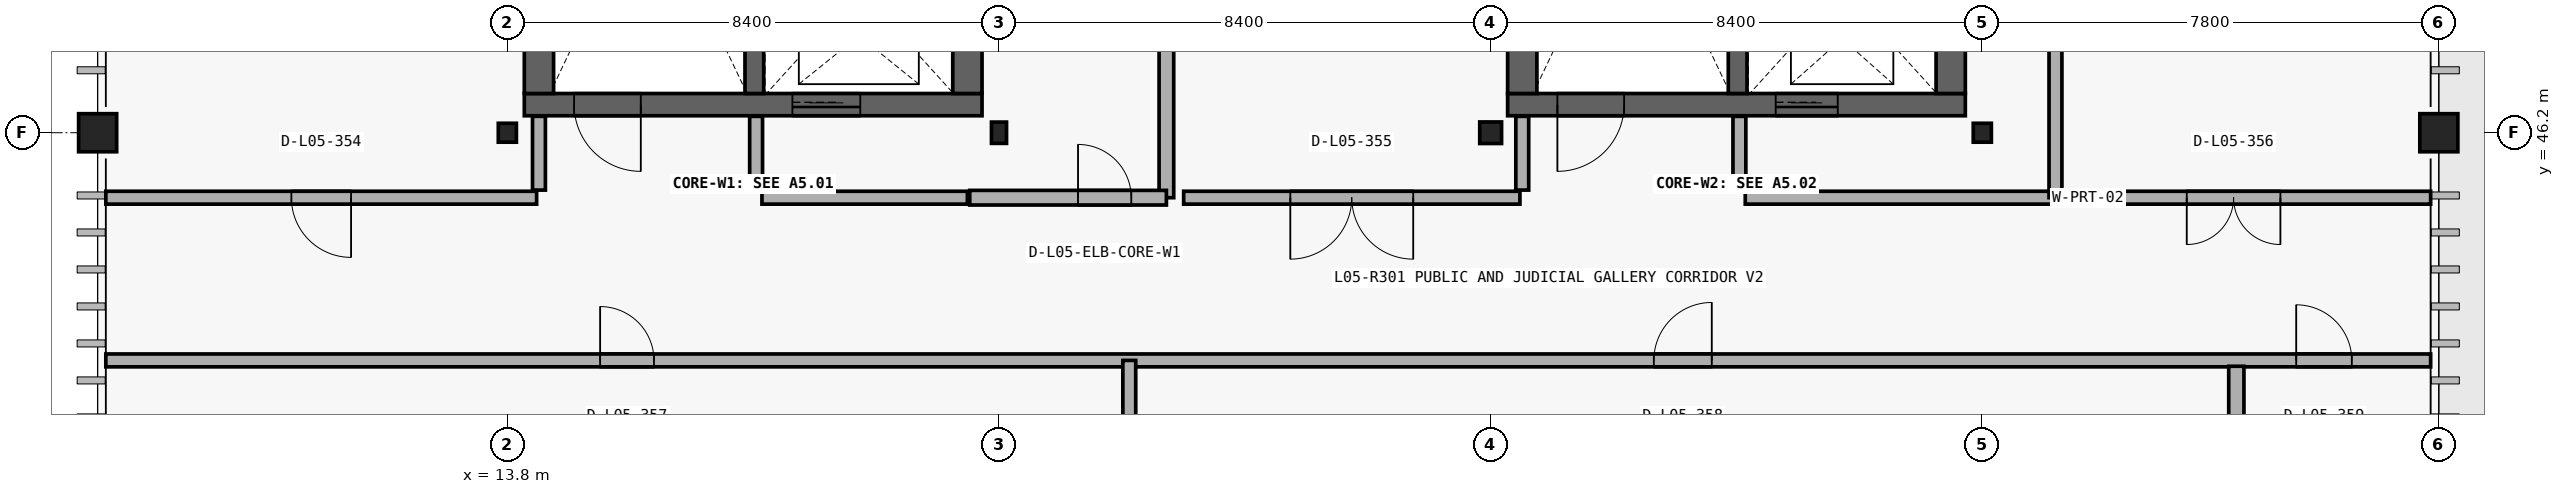
"""IFC4 building model, lengths in metres.
Left out: names, types, materials, properties, quantities, classifications, styles, units other than length and angle.
Written with IfcOpenShell. Run it as: python <this file> out.ifc"""

import sys

from ifc_helpers import new_model, si_unit, direction, frame, frame_2d, origin_with_axes, origin_2d_with_axis, place, context, subcontext, project, spatial, rectangle, circle, i_section, extrude, element, fill, save


model = new_model("IFC4")
c1 = context("Model", 3, precision=1e-05, world=origin_with_axes(), true_north=direction((0.0, 1.0)))
c2 = subcontext(c1, "Body", "Model", "MODEL_VIEW")
j1 = project(units=[si_unit("LENGTHUNIT", "METRE"), si_unit("PLANEANGLEUNIT", "RADIAN")], contexts=[c1])
p1 = place(None, origin_with_axes())
s1 = spatial("IfcSite", under=j1, at=p1, CompositionType="ELEMENT")
p2 = place(p1, origin_with_axes())
s2 = spatial("IfcBuilding", under=s1, at=p2, CompositionType="ELEMENT")
p3 = place(p2, frame((0.0, 0.0, 24.9), z_axis=(0.0, 0.0, 1.0), x_axis=(1.0, 0.0, 0.0)))
s3 = spatial("IfcBuildingStorey", under=s2, at=p3, CompositionType="ELEMENT", Elevation=24.9)
p4 = place(None, frame((14.09, 46.68, 24.9), z_axis=(0.0, 0.0, 1.0), x_axis=(1.0, 0.0, 0.0)))
e1 = element("IfcWall", 1, at=p4, inside=s3, PredefinedType="SHEAR", context=c2, shape_type="SweptSolid", body=[
    extrude(rectangle(XDim=7.82, YDim=0.38, at=frame_2d((3.91, 0.0), x_axis=(1.0, 0.0))), origin_with_axes(), (0.0, 0.0, 1.0), 4.8),
])
p5 = place(None, frame((15.51, 46.68, 24.9), z_axis=(0.0, 0.0, 1.0), x_axis=(1.0, 0.0, 0.0)))
e2 = element("IfcOpeningElement", 2, at=p5, cuts=e1, PredefinedType="OPENING", context=c2, shape_type="SweptSolid", body=[
    extrude(rectangle(XDim=1.14, YDim=2.18, at=frame_2d((0.0, 1.09), x_axis=(1.0, 0.0))), frame((0.0, 0.2, 0.0), z_axis=(0.0, -1.0, 0.0), x_axis=(1.0, 0.0, 0.0)), (0.0, 0.0, 1.0), 0.4),
])
p6 = place(None, frame((19.25, 46.68, 24.9), z_axis=(0.0, 0.0, 1.0), x_axis=(1.0, 0.0, 0.0)))
e3 = element("IfcOpeningElement", 3, at=p6, cuts=e1, PredefinedType="OPENING", context=c2, shape_type="SweptSolid", body=[
    extrude(rectangle(XDim=1.16, YDim=2.2, at=frame_2d((0.0, 1.1), x_axis=(1.0, 0.0))), frame((0.0, 0.2, 0.0), z_axis=(0.0, -1.0, 0.0), x_axis=(1.0, 0.0, 0.0)), (0.0, 0.0, 1.0), 0.4),
])
p7 = place(None, frame((21.66, 46.87, 24.9), z_axis=(0.0, 0.0, 1.0), x_axis=(0.0, 1.0, 0.0)))
e4 = element("IfcWall", 4, at=p7, inside=s3, PredefinedType="SHEAR", context=c2, shape_type="SweptSolid", body=[
    extrude(rectangle(XDim=7.06, YDim=0.5, at=frame_2d((3.53, 0.0), x_axis=(1.0, 0.0))), origin_with_axes(), (0.0, 0.0, 1.0), 4.8),
])
p8 = place(None, frame((21.66, 52.66, 24.9), z_axis=(0.0, 0.0, 1.0), x_axis=(0.0, 1.0, 0.0)))
e5 = element("IfcOpeningElement", 5, at=p8, cuts=e4, PredefinedType="OPENING", context=c2, shape_type="SweptSolid", body=[
    extrude(rectangle(XDim=1.16, YDim=2.2, at=frame_2d((0.0, 1.1), x_axis=(1.0, 0.0))), frame((0.0, 0.26, 0.0), z_axis=(0.0, -1.0, 0.0), x_axis=(1.0, 0.0, 0.0)), (0.0, 0.0, 1.0), 0.52),
])
p9 = place(None, frame((14.34, 53.93, 24.9), z_axis=(0.0, 0.0, 1.0), x_axis=(0.0, -1.0, 0.0)))
e6 = element("IfcWall", 6, at=p9, inside=s3, PredefinedType="SHEAR", context=c2, shape_type="SweptSolid", body=[
    extrude(rectangle(XDim=7.06, YDim=0.5, at=frame_2d((3.53, 0.0), x_axis=(1.0, 0.0))), origin_with_axes(), (0.0, 0.0, 1.0), 4.8),
])
p10 = place(None, frame((18.02, 46.87, 24.9), z_axis=(0.0, 0.0, 1.0), x_axis=(0.0, 1.0, 0.0)))
e7 = element("IfcWall", 7, at=p10, inside=s3, PredefinedType="SHEAR", context=c2, shape_type="SweptSolid", body=[
    extrude(rectangle(XDim=7.06, YDim=0.32, at=frame_2d((3.53, 0.0), x_axis=(1.0, 0.0))), origin_with_axes(), (0.0, 0.0, 1.0), 4.8),
])
p11 = place(None, frame((25.06, 45.09, 24.9), z_axis=(0.0, 0.0, 1.0), x_axis=(0.0, 1.0, 0.0)))
e8 = element("IfcWall", 8, at=p11, inside=s3, PredefinedType="PARTITIONING", context=c2, shape_type="SweptSolid", body=[
    extrude(rectangle(XDim=9.03, YDim=0.25, at=frame_2d((4.515, 0.0), x_axis=(1.0, 0.0))), origin_with_axes(), (0.0, 0.0, 1.0), 4.44),
])
p12 = place(None, frame((21.7, 45.09, 24.9), z_axis=(0.0, 0.0, 1.0), x_axis=(1.0, 0.0, 0.0)))
e9 = element("IfcWall", 9, at=p12, inside=s3, PredefinedType="PARTITIONING", context=c2, shape_type="SweptSolid", body=[
    extrude(rectangle(XDim=3.36, YDim=0.25, at=frame_2d((1.68, 0.0), x_axis=(1.0, 0.0))), origin_with_axes(), (0.0, 0.0, 1.0), 4.44),
])
p13 = place(None, frame((24.005, 45.09, 24.9), z_axis=(0.0, 0.0, 1.0), x_axis=(1.0, 0.0, 0.0)))
e10 = element("IfcOpeningElement", 10, at=p13, cuts=e9, PredefinedType="OPENING", context=c2, shape_type="SweptSolid", body=[
    extrude(rectangle(XDim=0.91, YDim=2.12, at=frame_2d((0.0, 1.06), x_axis=(1.0, 0.0))), frame((0.0, 0.135, 0.0), z_axis=(0.0, -1.0, 0.0), x_axis=(1.0, 0.0, 0.0)), (0.0, 0.0, 1.0), 0.27),
])
p14 = place(None, frame((30.89, 46.68, 24.9), z_axis=(0.0, 0.0, 1.0), x_axis=(1.0, 0.0, 0.0)))
e11 = element("IfcWall", 11, at=p14, inside=s3, PredefinedType="SHEAR", context=c2, shape_type="SweptSolid", body=[
    extrude(rectangle(XDim=7.82, YDim=0.38, at=frame_2d((3.91, 0.0), x_axis=(1.0, 0.0))), origin_with_axes(), (0.0, 0.0, 1.0), 4.8),
])
p15 = place(None, frame((32.31, 46.68, 24.9), z_axis=(0.0, 0.0, 1.0), x_axis=(1.0, 0.0, 0.0)))
e12 = element("IfcOpeningElement", 12, at=p15, cuts=e11, PredefinedType="OPENING", context=c2, shape_type="SweptSolid", body=[
    extrude(rectangle(XDim=1.14, YDim=2.18, at=frame_2d((0.0, 1.09), x_axis=(1.0, 0.0))), frame((0.0, 0.2, 0.0), z_axis=(0.0, -1.0, 0.0), x_axis=(1.0, 0.0, 0.0)), (0.0, 0.0, 1.0), 0.4),
])
p16 = place(None, frame((36.0, 46.68, 24.9), z_axis=(0.0, 0.0, 1.0), x_axis=(1.0, 0.0, 0.0)))
e13 = element("IfcOpeningElement", 13, at=p16, cuts=e11, PredefinedType="OPENING", context=c2, shape_type="SweptSolid", body=[
    extrude(rectangle(XDim=1.06, YDim=2.16, at=frame_2d((0.0, 1.08), x_axis=(1.0, 0.0))), frame((0.0, 0.2, 0.0), z_axis=(0.0, -1.0, 0.0), x_axis=(1.0, 0.0, 0.0)), (0.0, 0.0, 1.0), 0.4),
])
for number, where, z_axis, x_axis in (
    (14, (38.46, 46.87, 24.9), (0.0, 0.0, 1.0), (0.0, 1.0, 0.0)),
    (15, (31.14, 53.93, 24.9), (0.0, 0.0, 1.0), (0.0, -1.0, 0.0)),
):
    element("IfcWall", number, at=place(None, frame(where, z_axis=z_axis, x_axis=x_axis)), inside=s3, PredefinedType="SHEAR", context=c2, shape_type="SweptSolid", body=[
        extrude(rectangle(XDim=7.06, YDim=0.5, at=frame_2d((3.53, 0.0), x_axis=(1.0, 0.0))), origin_with_axes(), (0.0, 0.0, 1.0), 4.8),
    ])
p17 = place(None, frame((34.82, 46.87, 24.9), z_axis=(0.0, 0.0, 1.0), x_axis=(0.0, 1.0, 0.0)))
e16 = element("IfcWall", 16, at=p17, inside=s3, PredefinedType="SHEAR", context=c2, shape_type="SweptSolid", body=[
    extrude(rectangle(XDim=7.06, YDim=0.32, at=frame_2d((3.53, 0.0), x_axis=(1.0, 0.0))), origin_with_axes(), (0.0, 0.0, 1.0), 4.8),
])
for number, where, z_axis, x_axis in (
    (17, (14.34, 45.22, 24.9), (0.0, 0.0, 1.0), (0.0, 1.0, 0.0)),
    (18, (18.05, 45.22, 24.9), (0.0, 0.0, 1.0), (0.0, 1.0, 0.0)),
    (19, (31.14, 45.22, 24.9), (0.0, 0.0, 1.0), (0.0, 1.0, 0.0)),
    (20, (34.85, 45.22, 24.9), (0.0, 0.0, 1.0), (0.0, 1.0, 0.0)),
):
    element("IfcWall", number, at=place(None, frame(where, z_axis=z_axis, x_axis=x_axis)), inside=s3, PredefinedType="PARTITIONING", context=c2, shape_type="SweptSolid", body=[
        extrude(rectangle(XDim=1.26, YDim=0.22, at=frame_2d((0.63, 0.0), x_axis=(1.0, 0.0))), origin_with_axes(), (0.0, 0.0, 1.0), 4.44),
    ])
p18 = place(None, frame((6.94, 45.09, 24.9), z_axis=(0.0, 0.0, 1.0), x_axis=(1.0, 0.0, 0.0)))
e21 = element("IfcWall", 21, at=p18, inside=s3, PredefinedType="PARTITIONING", context=c2, shape_type="SweptSolid", body=[
    extrude(rectangle(XDim=7.36, YDim=0.22, at=frame_2d((3.68, 0.0), x_axis=(1.0, 0.0))), origin_with_axes(), (0.0, 0.0, 1.0), 4.44),
])
p19 = place(None, frame((10.62, 45.09, 24.9), z_axis=(0.0, 0.0, 1.0), x_axis=(1.0, 0.0, 0.0)))
e22 = element("IfcOpeningElement", 22, at=p19, cuts=e21, PredefinedType="OPENING", context=c2, shape_type="SweptSolid", body=[
    extrude(rectangle(XDim=1.02, YDim=2.36, at=frame_2d((0.0, 1.18), x_axis=(1.0, 0.0))), frame((0.0, 0.12, 0.0), z_axis=(0.0, -1.0, 0.0), x_axis=(1.0, 0.0, 0.0)), (0.0, 0.0, 1.0), 0.24),
])
p20 = place(None, frame((18.15, 45.09, 24.9), z_axis=(0.0, 0.0, 1.0), x_axis=(1.0, 0.0, 0.0)))
e23 = element("IfcWall", 23, at=p20, inside=s3, PredefinedType="PARTITIONING", context=c2, shape_type="SweptSolid", body=[
    extrude(rectangle(XDim=3.51, YDim=0.22, at=frame_2d((1.755, 0.0), x_axis=(1.0, 0.0))), origin_with_axes(), (0.0, 0.0, 1.0), 4.44),
])
p21 = place(None, frame((25.355, 45.09, 24.9), z_axis=(0.0, 0.0, 1.0), x_axis=(1.0, 0.0, 0.0)))
e24 = element("IfcWall", 24, at=p21, inside=s3, PredefinedType="PARTITIONING", context=c2, shape_type="SweptSolid", body=[
    extrude(rectangle(XDim=5.745, YDim=0.22, at=frame_2d((2.873, 0.0), x_axis=(1.0, 0.0))), origin_with_axes(), (0.0, 0.0, 1.0), 4.44),
])
p22 = place(None, frame((28.227, 45.09, 24.9), z_axis=(0.0, 0.0, 1.0), x_axis=(1.0, 0.0, 0.0)))
e25 = element("IfcOpeningElement", 25, at=p22, cuts=e24, PredefinedType="OPENING", context=c2, shape_type="SweptSolid", body=[
    extrude(rectangle(XDim=2.1, YDim=2.8, at=frame_2d((0.0, 1.4), x_axis=(1.0, 0.0))), frame((0.0, 0.12, 0.0), z_axis=(0.0, -1.0, 0.0), x_axis=(1.0, 0.0, 0.0)), (0.0, 0.0, 1.0), 0.24),
])
p23 = place(None, frame((34.95, 45.09, 24.9), z_axis=(0.0, 0.0, 1.0), x_axis=(1.0, 0.0, 0.0)))
e26 = element("IfcWall", 26, at=p23, inside=s3, PredefinedType="PARTITIONING", context=c2, shape_type="SweptSolid", body=[
    extrude(rectangle(XDim=11.71, YDim=0.22, at=frame_2d((5.855, 0.0), x_axis=(1.0, 0.0))), origin_with_axes(), (0.0, 0.0, 1.0), 4.44),
])
p24 = place(None, frame((43.293, 45.09, 24.9), z_axis=(0.0, 0.0, 1.0), x_axis=(1.0, 0.0, 0.0)))
e27 = element("IfcOpeningElement", 27, at=p24, cuts=e26, PredefinedType="OPENING", context=c2, shape_type="SweptSolid", body=[
    extrude(rectangle(XDim=1.6, YDim=2.32, at=frame_2d((0.0, 1.16), x_axis=(1.0, 0.0))), frame((0.0, 0.12, 0.0), z_axis=(0.0, -1.0, 0.0), x_axis=(1.0, 0.0, 0.0)), (0.0, 0.0, 1.0), 0.24),
])
p25 = place(None, frame((6.94, 42.31, 24.9), z_axis=(0.0, 0.0, 1.0), x_axis=(1.0, 0.0, 0.0)))
e28 = element("IfcWall", 28, at=p25, inside=s3, PredefinedType="PARTITIONING", context=c2, shape_type="SweptSolid", body=[
    extrude(rectangle(XDim=39.72, YDim=0.22, at=frame_2d((19.86, 0.0), x_axis=(1.0, 0.0))), origin_with_axes(), (0.0, 0.0, 1.0), 4.44),
])
p26 = place(None, frame((15.845, 42.31, 24.9), z_axis=(0.0, 0.0, 1.0), x_axis=(1.0, 0.0, 0.0)))
e29 = element("IfcOpeningElement", 29, at=p26, cuts=e28, PredefinedType="OPENING", context=c2, shape_type="SweptSolid", body=[
    extrude(rectangle(XDim=0.92, YDim=2.14, at=frame_2d((0.0, 1.07), x_axis=(1.0, 0.0))), frame((0.0, 0.12, 0.0), z_axis=(0.0, -1.0, 0.0), x_axis=(1.0, 0.0, 0.0)), (0.0, 0.0, 1.0), 0.24),
])
p27 = place(None, frame((33.883, 42.31, 24.9), z_axis=(0.0, 0.0, 1.0), x_axis=(1.0, 0.0, 0.0)))
e30 = element("IfcOpeningElement", 30, at=p27, cuts=e28, PredefinedType="OPENING", context=c2, shape_type="SweptSolid", body=[
    extrude(rectangle(XDim=0.99, YDim=2.22, at=frame_2d((0.0, 1.11), x_axis=(1.0, 0.0))), frame((0.0, 0.12, 0.0), z_axis=(0.0, -1.0, 0.0), x_axis=(1.0, 0.0, 0.0)), (0.0, 0.0, 1.0), 0.24),
])
p28 = place(None, frame((44.838, 42.31, 24.9), z_axis=(0.0, 0.0, 1.0), x_axis=(1.0, 0.0, 0.0)))
e31 = element("IfcOpeningElement", 31, at=p28, cuts=e28, PredefinedType="OPENING", context=c2, shape_type="SweptSolid", body=[
    extrude(rectangle(XDim=0.95, YDim=2.1, at=frame_2d((0.0, 1.05), x_axis=(1.0, 0.0))), frame((0.0, 0.12, 0.0), z_axis=(0.0, -1.0, 0.0), x_axis=(1.0, 0.0, 0.0)), (0.0, 0.0, 1.0), 0.24),
])
p29 = place(None, frame((43.34, 30.78, 24.9), z_axis=(0.0, 0.0, 1.0), x_axis=(0.0, 1.0, 0.0)))
e32 = element("IfcWall", 32, at=p29, inside=s3, PredefinedType="PLUMBINGWALL", context=c2, shape_type="SweptSolid", body=[
    extrude(rectangle(XDim=11.43, YDim=0.26, at=frame_2d((5.715, 0.0), x_axis=(1.0, 0.0))), origin_with_axes(), (0.0, 0.0, 1.0), 4.44),
])
p30 = place(None, frame((40.25, 45.09, 24.9), z_axis=(0.0, 0.0, 1.0), x_axis=(0.0, 1.0, 0.0)))
e33 = element("IfcWall", 33, at=p30, inside=s3, PredefinedType="PARTITIONING", context=c2, shape_type="SweptSolid", body=[
    extrude(rectangle(XDim=17.17, YDim=0.22, at=frame_2d((8.585, 0.0), x_axis=(1.0, 0.0))), origin_with_axes(), (0.0, 0.0, 1.0), 4.44),
])
p31 = place(None, frame((24.426, 30.74, 24.9), z_axis=(0.0, 0.0, 1.0), x_axis=(0.0, 1.0, 0.0)))
e34 = element("IfcWall", 34, at=p31, inside=s3, PredefinedType="PARTITIONING", context=c2, shape_type="SweptSolid", body=[
    extrude(rectangle(XDim=11.57, YDim=0.22, at=frame_2d((5.785, 0.0), x_axis=(1.0, 0.0))), origin_with_axes(), (0.0, 0.0, 1.0), 4.44),
])
p32 = place(None, frame((6.8, 46.2, 24.9), z_axis=(0.0, 0.0, 1.0), x_axis=(1.0, 0.0, 0.0)))
e35 = element("IfcColumn", 35, at=p32, inside=s3, PredefinedType="COLUMN", context=c2, shape_type="SweptSolid", body=[
    extrude(circle(Radius=0.325, at=origin_2d_with_axis()), origin_with_axes(), (0.0, 0.0, 1.0), 4.8),
])
p33 = place(None, frame((13.8, 46.2, 24.9), z_axis=(0.0, 0.0, 1.0), x_axis=(1.0, 0.0, 0.0)))
e36 = element("IfcColumn", 36, at=p33, inside=s3, PredefinedType="COLUMN", context=c2, shape_type="SweptSolid", body=[
    extrude(i_section(OverallWidth=0.309, OverallDepth=0.323, WebThickness=0.014, FlangeThickness=0.023, at=origin_2d_with_axis()), origin_with_axes(), (0.0, 0.0, 1.0), 4.8),
])
p34 = place(None, frame((22.2, 46.2, 24.9), z_axis=(0.0, 0.0, 1.0), x_axis=(1.0, 0.0, 0.0)))
e37 = element("IfcColumn", 37, at=p34, inside=s3, PredefinedType="COLUMN", context=c2, shape_type="SweptSolid", body=[
    extrude(i_section(OverallWidth=0.257, OverallDepth=0.363, WebThickness=0.013, FlangeThickness=0.022, at=origin_2d_with_axis()), origin_with_axes(), (0.0, 0.0, 1.0), 4.8),
])
p35 = place(None, frame((30.6, 46.2, 24.9), z_axis=(0.0, 0.0, 1.0), x_axis=(1.0, 0.0, 0.0)))
e38 = element("IfcColumn", 38, at=p35, inside=s3, PredefinedType="COLUMN", context=c2, shape_type="SweptSolid", body=[
    extrude(i_section(OverallWidth=0.373, OverallDepth=0.368, WebThickness=0.015, FlangeThickness=0.024, at=origin_2d_with_axis()), origin_with_axes(), (0.0, 0.0, 1.0), 4.8),
])
p36 = place(None, frame((39.0, 46.2, 24.9), z_axis=(0.0, 0.0, 1.0), x_axis=(1.0, 0.0, 0.0)))
e39 = element("IfcColumn", 39, at=p36, inside=s3, PredefinedType="COLUMN", context=c2, shape_type="SweptSolid", body=[
    extrude(i_section(OverallWidth=0.309, OverallDepth=0.323, WebThickness=0.014, FlangeThickness=0.023, at=origin_2d_with_axis()), origin_with_axes(), (0.0, 0.0, 1.0), 4.8),
])
p37 = place(None, frame((46.8, 46.2, 24.9), z_axis=(0.0, 0.0, 1.0), x_axis=(1.0, 0.0, 0.0)))
e40 = element("IfcColumn", 40, at=p37, inside=s3, PredefinedType="COLUMN", context=c2, shape_type="SweptSolid", body=[
    extrude(circle(Radius=0.325, at=origin_2d_with_axis()), origin_with_axes(), (0.0, 0.0, 1.0), 4.8),
])
p38 = place(None, frame((15.51, 46.68, 24.9), z_axis=(0.0, 0.0, 1.0), x_axis=(-1.0, 0.0, 0.0)))
e41 = element("IfcDoor", 41, at=p38, inside=s3, OperationType="SINGLE_SWING_RIGHT", PredefinedType="DOOR", context=c2, shape_type="SweptSolid", body=[
    extrude(rectangle(XDim=1.14, YDim=2.18, at=frame_2d((0.0, 1.09), x_axis=(1.0, 0.0))), frame((0.0, 0.04, 0.0), z_axis=(0.0, -1.0, 0.0), x_axis=(1.0, 0.0, 0.0)), (0.0, 0.0, 1.0), 0.08),
])
fill(e2, e41)
p39 = place(None, frame((19.25, 46.68, 24.9), z_axis=(0.0, 0.0, 1.0), x_axis=(-1.0, 0.0, 0.0)))
e42 = element("IfcDoor", 42, at=p39, inside=s3, OperationType="SLIDING_TO_LEFT", PredefinedType="DOOR", context=c2, shape_type="SweptSolid", body=[
    extrude(rectangle(XDim=1.16, YDim=2.2, at=frame_2d((0.0, 1.1), x_axis=(1.0, 0.0))), frame((0.0, 0.04, 0.0), z_axis=(0.0, -1.0, 0.0), x_axis=(1.0, 0.0, 0.0)), (0.0, 0.0, 1.0), 0.08),
])
fill(e3, e42)
p40 = place(None, frame((24.005, 45.09, 24.9), z_axis=(0.0, 0.0, 1.0), x_axis=(1.0, 0.0, 0.0)))
e43 = element("IfcDoor", 43, at=p40, inside=s3, OperationType="SINGLE_SWING_LEFT", PredefinedType="DOOR", context=c2, shape_type="SweptSolid", body=[
    extrude(rectangle(XDim=0.91, YDim=2.12, at=frame_2d((0.0, 1.06), x_axis=(1.0, 0.0))), frame((0.0, 0.04, 0.0), z_axis=(0.0, -1.0, 0.0), x_axis=(1.0, 0.0, 0.0)), (0.0, 0.0, 1.0), 0.08),
])
fill(e10, e43)
p41 = place(None, frame((32.31, 46.68, 24.9), z_axis=(0.0, 0.0, 1.0), x_axis=(-1.0, 0.0, 0.0)))
e44 = element("IfcDoor", 44, at=p41, inside=s3, OperationType="SINGLE_SWING_LEFT", PredefinedType="DOOR", context=c2, shape_type="SweptSolid", body=[
    extrude(rectangle(XDim=1.14, YDim=2.18, at=frame_2d((0.0, 1.09), x_axis=(1.0, 0.0))), frame((0.0, 0.04, 0.0), z_axis=(0.0, -1.0, 0.0), x_axis=(1.0, 0.0, 0.0)), (0.0, 0.0, 1.0), 0.08),
])
fill(e12, e44)
p42 = place(None, frame((36.0, 46.68, 24.9), z_axis=(0.0, 0.0, 1.0), x_axis=(-1.0, 0.0, 0.0)))
e45 = element("IfcDoor", 45, at=p42, inside=s3, OperationType="SLIDING_TO_LEFT", PredefinedType="DOOR", context=c2, shape_type="SweptSolid", body=[
    extrude(rectangle(XDim=1.06, YDim=2.16, at=frame_2d((0.0, 1.08), x_axis=(1.0, 0.0))), frame((0.0, 0.04, 0.0), z_axis=(0.0, -1.0, 0.0), x_axis=(1.0, 0.0, 0.0)), (0.0, 0.0, 1.0), 0.08),
])
fill(e13, e45)
p43 = place(None, frame((10.62, 45.09, 24.9), z_axis=(0.0, 0.0, 1.0), x_axis=(-1.0, 0.0, 0.0)))
e46 = element("IfcDoor", 46, at=p43, inside=s3, OperationType="SINGLE_SWING_RIGHT", PredefinedType="DOOR", context=c2, shape_type="SweptSolid", body=[
    extrude(rectangle(XDim=1.02, YDim=2.36, at=frame_2d((0.0, 1.18), x_axis=(1.0, 0.0))), frame((0.0, 0.04, 0.0), z_axis=(0.0, -1.0, 0.0), x_axis=(1.0, 0.0, 0.0)), (0.0, 0.0, 1.0), 0.08),
])
fill(e22, e46)
p44 = place(None, frame((28.227, 45.09, 24.9), z_axis=(0.0, 0.0, 1.0), x_axis=(-1.0, 0.0, 0.0)))
e47 = element("IfcDoor", 47, at=p44, inside=s3, OperationType="DOUBLE_DOOR_SINGLE_SWING", PredefinedType="DOOR", context=c2, shape_type="SweptSolid", body=[
    extrude(rectangle(XDim=2.1, YDim=2.8, at=frame_2d((0.0, 1.4), x_axis=(1.0, 0.0))), frame((0.0, 0.04, 0.0), z_axis=(0.0, -1.0, 0.0), x_axis=(1.0, 0.0, 0.0)), (0.0, 0.0, 1.0), 0.08),
])
fill(e25, e47)
p45 = place(None, frame((43.293, 45.09, 24.9), z_axis=(0.0, 0.0, 1.0), x_axis=(-1.0, 0.0, 0.0)))
e48 = element("IfcDoor", 48, at=p45, inside=s3, OperationType="DOUBLE_DOOR_SINGLE_SWING", PredefinedType="DOOR", context=c2, shape_type="SweptSolid", body=[
    extrude(rectangle(XDim=1.6, YDim=2.32, at=frame_2d((0.0, 1.16), x_axis=(1.0, 0.0))), frame((0.0, 0.04, 0.0), z_axis=(0.0, -1.0, 0.0), x_axis=(1.0, 0.0, 0.0)), (0.0, 0.0, 1.0), 0.08),
])
fill(e27, e48)
p46 = place(None, frame((15.845, 42.31, 24.9), z_axis=(0.0, 0.0, 1.0), x_axis=(1.0, 0.0, 0.0)))
e49 = element("IfcDoor", 49, at=p46, inside=s3, OperationType="SINGLE_SWING_LEFT", PredefinedType="DOOR", context=c2, shape_type="SweptSolid", body=[
    extrude(rectangle(XDim=0.92, YDim=2.14, at=frame_2d((0.0, 1.07), x_axis=(1.0, 0.0))), frame((0.0, 0.04, 0.0), z_axis=(0.0, -1.0, 0.0), x_axis=(1.0, 0.0, 0.0)), (0.0, 0.0, 1.0), 0.08),
])
fill(e29, e49)
p47 = place(None, frame((33.883, 42.31, 24.9), z_axis=(0.0, 0.0, 1.0), x_axis=(1.0, 0.0, 0.0)))
e50 = element("IfcDoor", 50, at=p47, inside=s3, OperationType="SINGLE_SWING_RIGHT", PredefinedType="DOOR", context=c2, shape_type="SweptSolid", body=[
    extrude(rectangle(XDim=0.99, YDim=2.22, at=frame_2d((0.0, 1.11), x_axis=(1.0, 0.0))), frame((0.0, 0.04, 0.0), z_axis=(0.0, -1.0, 0.0), x_axis=(1.0, 0.0, 0.0)), (0.0, 0.0, 1.0), 0.08),
])
fill(e30, e50)
p48 = place(None, frame((44.838, 42.31, 24.9), z_axis=(0.0, 0.0, 1.0), x_axis=(1.0, 0.0, 0.0)))
e51 = element("IfcDoor", 51, at=p48, inside=s3, OperationType="SINGLE_SWING_LEFT", PredefinedType="DOOR", context=c2, shape_type="SweptSolid", body=[
    extrude(rectangle(XDim=0.95, YDim=2.1, at=frame_2d((0.0, 1.05), x_axis=(1.0, 0.0))), frame((0.0, 0.04, 0.0), z_axis=(0.0, -1.0, 0.0), x_axis=(1.0, 0.0, 0.0)), (0.0, 0.0, 1.0), 0.08),
])
fill(e31, e51)
save(model, sys.argv[1])
